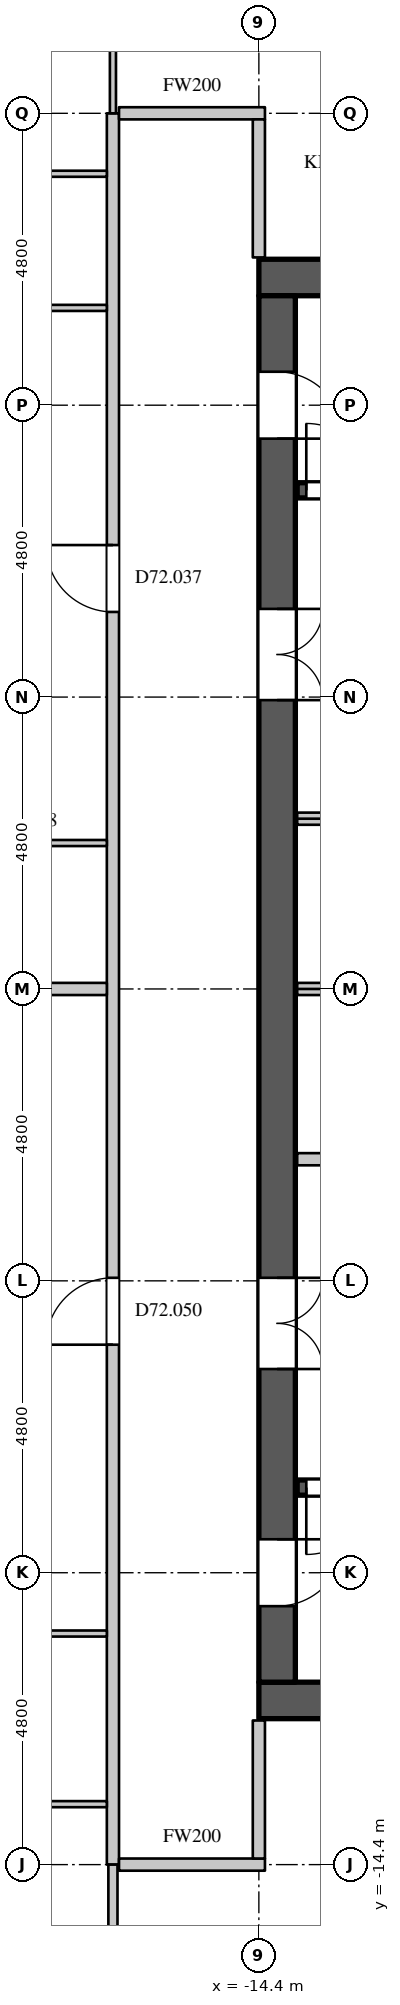
"""IFC4 building model, lengths in metres.
Left out: names, types, materials, properties, quantities, classifications, styles, units other than length and angle.
Written with IfcOpenShell. Run it as: python <this file> out.ifc"""

import sys

from ifc_helpers import new_model, si_unit, direction, frame, frame_2d, origin, place, context, subcontext, project, spatial, rectangle, extrude, element, fill, save


model = new_model("IFC4")
c1 = context("Model", 3, precision=1e-05, world=origin(), true_north=direction((0.0, 1.0)))
c2 = subcontext(c1, "Body", "Model", "MODEL_VIEW")
j1 = project(units=[si_unit("LENGTHUNIT", "METRE"), si_unit("PLANEANGLEUNIT", "RADIAN")], contexts=[c1])
p1 = place(None, origin())
s1 = spatial("IfcSite", under=j1, at=p1, CompositionType="ELEMENT")
p2 = place(p1, origin())
s2 = spatial("IfcBuilding", under=s1, at=p2, CompositionType="ELEMENT")
p3 = place(p2, frame((0.0, 0.0, 310.5)))
s3 = spatial("IfcBuildingStorey", under=s2, at=p3, CompositionType="ELEMENT", Elevation=310.5)
for number, where, z_axis, x_axis in (
    (1, (-14.4, 11.7, 0.0), (0.0, 0.0, 1.0), (1.0, 0.0, 0.0)),
    (2, (-14.4, -11.7, 0.0), (0.0, 0.0, 1.0), (1.0, 0.0, 0.0)),
):
    element("IfcWall", number, at=place(p3, frame(where, z_axis=z_axis, x_axis=x_axis)), inside=s3, PredefinedType="SHEAR", context=c2, shape_type="SweptSolid", body=[
        extrude(rectangle(XDim=28.8, YDim=0.6, at=frame_2d((14.4, 0.0))), origin(), (0.0, 0.0, 1.0), 4.2),
    ])
p4 = place(p3, frame((-14.1, -11.4, 0.0), z_axis=(0.0, 0.0, 1.0), x_axis=(0.0, 1.0, 0.0)))
e3 = element("IfcWall", 3, at=p4, inside=s3, PredefinedType="SHEAR", context=c2, shape_type="SweptSolid", body=[
    extrude(rectangle(XDim=22.8, YDim=0.6, at=frame_2d((11.4, 0.0))), origin(), (0.0, 0.0, 1.0), 4.2),
])
p5 = place(p4, frame((20.45, 0.0, 0.0)))
e4 = element("IfcOpeningElement", 4, at=p5, cuts=e3, PredefinedType="OPENING", context=c2, shape_type="SweptSolid", body=[
    extrude(rectangle(XDim=1.1, YDim=2.2, at=frame_2d((0.55, 1.1))), frame((0.0, 0.31, 0.0), z_axis=(0.0, -1.0, 0.0), x_axis=(1.0, 0.0, 0.0)), (0.0, 0.0, 1.0), 0.62),
])
p6 = place(p4, frame((1.25, 0.0, 0.0)))
e5 = element("IfcOpeningElement", 5, at=p6, cuts=e3, PredefinedType="OPENING", context=c2, shape_type="SweptSolid", body=[
    extrude(rectangle(XDim=1.1, YDim=2.2, at=frame_2d((0.55, 1.1))), frame((0.0, 0.31, 0.0), z_axis=(0.0, -1.0, 0.0), x_axis=(1.0, 0.0, 0.0)), (0.0, 0.0, 1.0), 0.62),
])
p7 = place(p4, frame((16.15, 0.0, 0.0)))
e6 = element("IfcOpeningElement", 6, at=p7, cuts=e3, PredefinedType="OPENING", context=c2, shape_type="SweptSolid", body=[
    extrude(rectangle(XDim=1.5, YDim=2.4, at=frame_2d((0.75, 1.2))), frame((0.0, 0.31, 0.0), z_axis=(0.0, -1.0, 0.0), x_axis=(1.0, 0.0, 0.0)), (0.0, 0.0, 1.0), 0.62),
])
p8 = place(p4, frame((5.15, 0.0, 0.0)))
e7 = element("IfcOpeningElement", 7, at=p8, cuts=e3, PredefinedType="OPENING", context=c2, shape_type="SweptSolid", body=[
    extrude(rectangle(XDim=1.5, YDim=2.4, at=frame_2d((0.75, 1.2))), frame((0.0, 0.31, 0.0), z_axis=(0.0, -1.0, 0.0), x_axis=(1.0, 0.0, 0.0)), (0.0, 0.0, 1.0), 0.62),
])
p9 = place(p3, frame((-16.8, -14.4, 0.0), z_axis=(0.0, 0.0, 1.0), x_axis=(0.0, 1.0, 0.0)))
e8 = element("IfcWall", 8, at=p9, inside=s3, PredefinedType="PARTITIONING", context=c2, shape_type="SweptSolid", body=[
    extrude(rectangle(XDim=28.8, YDim=0.2, at=frame_2d((14.4, 0.0))), origin(), (0.0, 0.0, 1.0), 3.9),
])
p10 = place(p9, frame((20.6, 0.0, 0.0)))
e9 = element("IfcOpeningElement", 9, at=p10, cuts=e8, PredefinedType="OPENING", context=c2, shape_type="SweptSolid", body=[
    extrude(rectangle(XDim=1.1, YDim=2.4, at=frame_2d((0.55, 1.2))), frame((0.0, 0.11, 0.0), z_axis=(0.0, -1.0, 0.0), x_axis=(1.0, 0.0, 0.0)), (0.0, 0.0, 1.0), 0.22),
])
p11 = place(p9, frame((8.55, 0.0, 0.0)))
e10 = element("IfcOpeningElement", 10, at=p11, cuts=e8, PredefinedType="OPENING", context=c2, shape_type="SweptSolid", body=[
    extrude(rectangle(XDim=1.1, YDim=2.4, at=frame_2d((0.55, 1.2))), frame((0.0, 0.11, 0.0), z_axis=(0.0, -1.0, 0.0), x_axis=(1.0, 0.0, 0.0)), (0.0, 0.0, 1.0), 0.22),
])
for number, where, z_axis, x_axis in (
    (11, (-16.7, -14.4, 0.0), (0.0, 0.0, 1.0), (1.0, 0.0, 0.0)),
    (12, (-16.7, 14.4, 0.0), (0.0, 0.0, 1.0), (1.0, 0.0, 0.0)),
):
    element("IfcWall", number, at=place(p3, frame(where, z_axis=z_axis, x_axis=x_axis)), inside=s3, PredefinedType="PARTITIONING", context=c2, shape_type="SweptSolid", body=[
        extrude(rectangle(XDim=2.4, YDim=0.2, at=frame_2d((1.2, 0.0))), origin(), (0.0, 0.0, 1.0), 3.9),
    ])
for number, where, z_axis, x_axis in (
    (13, (-14.4, -14.3, 0.0), (0.0, 0.0, 1.0), (0.0, 1.0, 0.0)),
    (14, (-14.4, 12.03, 0.0), (0.0, 0.0, 1.0), (0.0, 1.0, 0.0)),
):
    element("IfcWall", number, at=place(p3, frame(where, z_axis=z_axis, x_axis=x_axis)), inside=s3, PredefinedType="PARTITIONING", context=c2, shape_type="SweptSolid", body=[
        extrude(rectangle(XDim=2.27, YDim=0.2, at=frame_2d((1.135, 0.0))), origin(), (0.0, 0.0, 1.0), 3.9),
    ])
p12 = place(p3, frame((-16.8, -19.828, 0.0), z_axis=(0.0, 0.0, 1.0), x_axis=(0.0, 1.0, 0.0)))
e15 = element("IfcWall", 15, at=p12, inside=s3, PredefinedType="PARTITIONING", context=c2, shape_type="SweptSolid", body=[
    extrude(rectangle(XDim=5.428, YDim=0.15, at=frame_2d((2.714, 0.0))), origin(), (0.0, 0.0, 1.0), 3.9),
])
p13 = place(p12, frame((2.45, 0.0, 0.0)))
e16 = element("IfcOpeningElement", 16, at=p13, cuts=e15, PredefinedType="OPENING", context=c2, shape_type="SweptSolid", body=[
    extrude(rectangle(XDim=0.9, YDim=2.2, at=frame_2d((0.45, 1.1))), frame((0.0, 0.085, 0.0), z_axis=(0.0, -1.0, 0.0), x_axis=(1.0, 0.0, 0.0)), (0.0, 0.0, 1.0), 0.17),
])
p14 = place(p3, frame((-26.455, 0.0, 0.0), z_axis=(0.0, 0.0, 1.0), x_axis=(1.0, 0.0, 0.0)))
e17 = element("IfcWall", 17, at=p14, inside=s3, PredefinedType="PARTITIONING", context=c2, shape_type="SweptSolid", body=[
    extrude(rectangle(XDim=9.555, YDim=0.2, at=frame_2d((4.778, 0.0))), origin(), (0.0, 0.0, 1.0), 3.9),
])
p15 = place(p3, frame((-13.77, -2.8, 0.0), z_axis=(0.0, 0.0, 1.0), x_axis=(1.0, 0.0, 0.0)))
e18 = element("IfcWall", 18, at=p15, inside=s3, PredefinedType="PARTITIONING", context=c2, shape_type="SweptSolid", body=[
    extrude(rectangle(XDim=3.37, YDim=0.2, at=frame_2d((1.685, 0.0))), origin(), (0.0, 0.0, 1.0), 3.9),
])
p16 = place(p15, frame((1.35, 0.0, 0.0)))
e19 = element("IfcOpeningElement", 19, at=p16, cuts=e18, PredefinedType="OPENING", context=c2, shape_type="SweptSolid", body=[
    extrude(rectangle(XDim=0.6, YDim=2.0, at=frame_2d((0.3, 1.0))), frame((0.0, 0.11, 0.0), z_axis=(0.0, -1.0, 0.0), x_axis=(1.0, 0.0, 0.0)), (0.0, 0.0, 1.0), 0.22),
])
p17 = place(p3, frame((-13.77, 0.0, 0.0), z_axis=(0.0, 0.0, 1.0), x_axis=(1.0, 0.0, 0.0)))
e20 = element("IfcWall", 20, at=p17, inside=s3, PredefinedType="PARTITIONING", context=c2, shape_type="SweptSolid", body=[
    extrude(rectangle(XDim=21.57, YDim=0.2, at=frame_2d((10.785, 0.0))), origin(), (0.0, 0.0, 1.0), 3.9),
])
p18 = place(p3, frame((-13.77, 2.8, 0.0), z_axis=(0.0, 0.0, 1.0), x_axis=(1.0, 0.0, 0.0)))
e21 = element("IfcWall", 21, at=p18, inside=s3, PredefinedType="PARTITIONING", context=c2, shape_type="SweptSolid", body=[
    extrude(rectangle(XDim=5.95, YDim=0.2, at=frame_2d((2.975, 0.0))), origin(), (0.0, 0.0, 1.0), 3.9),
])
p19 = place(p18, frame((1.1, 0.0, 0.0)))
e22 = element("IfcOpeningElement", 22, at=p19, cuts=e21, PredefinedType="OPENING", context=c2, shape_type="SweptSolid", body=[
    extrude(rectangle(XDim=1.1, YDim=2.2, at=frame_2d((0.55, 1.1))), frame((0.0, 0.11, 0.0), z_axis=(0.0, -1.0, 0.0), x_axis=(1.0, 0.0, 0.0)), (0.0, 0.0, 1.0), 0.22),
])
p20 = place(p18, frame((4.1, 0.0, 0.0)))
e23 = element("IfcOpeningElement", 23, at=p20, cuts=e21, PredefinedType="OPENING", context=c2, shape_type="SweptSolid", body=[
    extrude(rectangle(XDim=1.1, YDim=2.2, at=frame_2d((0.55, 1.1))), frame((0.0, 0.11, 0.0), z_axis=(0.0, -1.0, 0.0), x_axis=(1.0, 0.0, 0.0)), (0.0, 0.0, 1.0), 0.22),
])
p21 = place(p3, frame((-13.77, -8.2, 0.0), z_axis=(0.0, 0.0, 1.0), x_axis=(1.0, 0.0, 0.0)))
e24 = element("IfcWall", 24, at=p21, inside=s3, PredefinedType="SHEAR", context=c2, shape_type="SweptSolid", body=[
    extrude(rectangle(XDim=8.495, YDim=0.25, at=frame_2d((4.248, 0.0))), origin(), (0.0, 0.0, 1.0), 3.9),
])
p22 = place(p21, frame((0.15, 0.0, 0.0)))
e25 = element("IfcOpeningElement", 25, at=p22, cuts=e24, PredefinedType="OPENING", context=c2, shape_type="SweptSolid", body=[
    extrude(rectangle(XDim=1.1, YDim=2.2, at=frame_2d((0.55, 1.1))), frame((0.0, 0.135, 0.0), z_axis=(0.0, -1.0, 0.0), x_axis=(1.0, 0.0, 0.0)), (0.0, 0.0, 1.0), 0.27),
])
p23 = place(p3, frame((-13.77, 8.2, 0.0), z_axis=(0.0, 0.0, 1.0), x_axis=(1.0, 0.0, 0.0)))
e26 = element("IfcWall", 26, at=p23, inside=s3, PredefinedType="SHEAR", context=c2, shape_type="SweptSolid", body=[
    extrude(rectangle(XDim=8.495, YDim=0.25, at=frame_2d((4.248, 0.0))), origin(), (0.0, 0.0, 1.0), 3.9),
])
p24 = place(p23, frame((0.15, 0.0, 0.0)))
e27 = element("IfcOpeningElement", 27, at=p24, cuts=e26, PredefinedType="OPENING", context=c2, shape_type="SweptSolid", body=[
    extrude(rectangle(XDim=1.1, YDim=2.2, at=frame_2d((0.55, 1.1))), frame((0.0, 0.135, 0.0), z_axis=(0.0, -1.0, 0.0), x_axis=(1.0, 0.0, 0.0)), (0.0, 0.0, 1.0), 0.27),
])
p25 = place(p3, frame((-20.55, -13.406, 0.0), z_axis=(0.0, 0.0, 1.0), x_axis=(1.0, 0.0, 0.0)))
e28 = element("IfcWall", 28, at=p25, inside=s3, PredefinedType="PARTITIONING", context=c2, shape_type="SweptSolid", body=[
    extrude(rectangle(XDim=3.65, YDim=0.1, at=frame_2d((1.825, 0.0))), origin(), (0.0, 0.0, 1.0), 3.9),
])
p26 = place(p3, frame((-20.475, -10.6, 0.0), z_axis=(0.0, 0.0, 1.0), x_axis=(1.0, 0.0, 0.0)))
e29 = element("IfcWall", 29, at=p26, inside=s3, PredefinedType="PARTITIONING", context=c2, shape_type="SweptSolid", body=[
    extrude(rectangle(XDim=3.575, YDim=0.1, at=frame_2d((1.788, 0.0))), origin(), (0.0, 0.0, 1.0), 3.9),
])
p27 = place(p26, frame((1.3, 0.0, 0.0)))
e30 = element("IfcOpeningElement", 30, at=p27, cuts=e29, PredefinedType="OPENING", context=c2, shape_type="SweptSolid", body=[
    extrude(rectangle(XDim=0.9, YDim=2.2, at=frame_2d((0.45, 1.1))), frame((0.0, 0.06, 0.0), z_axis=(0.0, -1.0, 0.0), x_axis=(1.0, 0.0, 0.0)), (0.0, 0.0, 1.0), 0.12),
])
p28 = place(p3, frame((-20.275, 2.4, 0.0), z_axis=(0.0, 0.0, 1.0), x_axis=(1.0, 0.0, 0.0)))
e31 = element("IfcWall", 31, at=p28, inside=s3, PredefinedType="PARTITIONING", context=c2, shape_type="SweptSolid", body=[
    extrude(rectangle(XDim=3.375, YDim=0.1, at=frame_2d((1.688, 0.0))), origin(), (0.0, 0.0, 1.0), 3.9),
])
p29 = place(p28, frame((1.2, 0.0, 0.0)))
e32 = element("IfcOpeningElement", 32, at=p29, cuts=e31, PredefinedType="OPENING", context=c2, shape_type="SweptSolid", body=[
    extrude(rectangle(XDim=0.9, YDim=2.2, at=frame_2d((0.45, 1.1))), frame((0.0, 0.06, 0.0), z_axis=(0.0, -1.0, 0.0), x_axis=(1.0, 0.0, 0.0)), (0.0, 0.0, 1.0), 0.12),
])
p30 = place(p3, frame((-18.975, 11.2, 0.0), z_axis=(0.0, 0.0, 1.0), x_axis=(1.0, 0.0, 0.0)))
e33 = element("IfcWall", 33, at=p30, inside=s3, PredefinedType="PARTITIONING", context=c2, shape_type="SweptSolid", body=[
    extrude(rectangle(XDim=2.075, YDim=0.1, at=frame_2d((1.038, 0.0))), origin(), (0.0, 0.0, 1.0), 3.3),
])
p31 = place(p30, frame((0.15, 0.0, 0.0)))
e34 = element("IfcOpeningElement", 34, at=p31, cuts=e33, PredefinedType="OPENING", context=c2, shape_type="SweptSolid", body=[
    extrude(rectangle(XDim=0.9, YDim=2.2, at=frame_2d((0.45, 1.1))), frame((0.0, 0.06, 0.0), z_axis=(0.0, -1.0, 0.0), x_axis=(1.0, 0.0, 0.0)), (0.0, 0.0, 1.0), 0.12),
])
p32 = place(p3, frame((-19.9, 13.406, 0.0), z_axis=(0.0, 0.0, 1.0), x_axis=(1.0, 0.0, 0.0)))
e35 = element("IfcWall", 35, at=p32, inside=s3, PredefinedType="PARTITIONING", context=c2, shape_type="SweptSolid", body=[
    extrude(rectangle(XDim=3.0, YDim=0.1, at=frame_2d((1.5, 0.0))), origin(), (0.0, 0.0, 1.0), 3.9),
])
p33 = place(p3, frame((-16.8, 14.4, 0.0), z_axis=(0.0, 0.0, 1.0), x_axis=(0.0, 1.0, 0.0)))
e36 = element("IfcWall", 36, at=p33, inside=s3, PredefinedType="PARTITIONING", context=c2, shape_type="SweptSolid", body=[
    extrude(rectangle(XDim=3.9, YDim=0.1, at=frame_2d((1.95, 0.0))), origin(), (0.0, 0.0, 1.0), 3.9),
])
p34 = place(p24, origin())
e37 = element("IfcDoor", 37, at=p34, inside=s3, OperationType="SINGLE_SWING_LEFT", PredefinedType="DOOR", context=c2, shape_type="SweptSolid", body=[
    extrude(rectangle(XDim=1.1, YDim=2.2, at=frame_2d((0.55, 1.1))), frame((0.0, 0.025, 0.0), z_axis=(0.0, -1.0, 0.0), x_axis=(1.0, 0.0, 0.0)), (0.0, 0.0, 1.0), 0.05),
])
fill(e27, e37)
p35 = place(p22, origin())
e38 = element("IfcDoor", 38, at=p35, inside=s3, OperationType="SINGLE_SWING_RIGHT", PredefinedType="DOOR", context=c2, shape_type="SweptSolid", body=[
    extrude(rectangle(XDim=1.1, YDim=2.2, at=frame_2d((0.55, 1.1))), frame((0.0, 0.025, 0.0), z_axis=(0.0, -1.0, 0.0), x_axis=(1.0, 0.0, 0.0)), (0.0, 0.0, 1.0), 0.05),
])
fill(e25, e38)
p36 = place(p5, origin())
e39 = element("IfcDoor", 39, at=p36, inside=s3, OperationType="SINGLE_SWING_RIGHT", PredefinedType="DOOR", context=c2, shape_type="SweptSolid", body=[
    extrude(rectangle(XDim=1.1, YDim=2.2, at=frame_2d((0.55, 1.1))), frame((0.0, -0.245, 0.0), z_axis=(0.0, -1.0, 0.0), x_axis=(1.0, 0.0, 0.0)), (0.0, 0.0, 1.0), 0.05),
])
fill(e4, e39)
p37 = place(p6, origin())
e40 = element("IfcDoor", 40, at=p37, inside=s3, OperationType="SINGLE_SWING_LEFT", PredefinedType="DOOR", context=c2, shape_type="SweptSolid", body=[
    extrude(rectangle(XDim=1.1, YDim=2.2, at=frame_2d((0.55, 1.1))), frame((0.0, -0.245, 0.0), z_axis=(0.0, -1.0, 0.0), x_axis=(1.0, 0.0, 0.0)), (0.0, 0.0, 1.0), 0.05),
])
fill(e5, e40)
p38 = place(p7, origin())
e41 = element("IfcDoor", 41, at=p38, inside=s3, OperationType="DOUBLE_DOOR_SINGLE_SWING", PredefinedType="DOOR", context=c2, shape_type="SweptSolid", body=[
    extrude(rectangle(XDim=1.5, YDim=2.4, at=frame_2d((0.75, 1.2))), frame((0.0, -0.245, 0.0), z_axis=(0.0, -1.0, 0.0), x_axis=(1.0, 0.0, 0.0)), (0.0, 0.0, 1.0), 0.05),
])
fill(e6, e41)
p39 = place(p8, origin())
e42 = element("IfcDoor", 42, at=p39, inside=s3, OperationType="DOUBLE_DOOR_SINGLE_SWING", PredefinedType="DOOR", context=c2, shape_type="SweptSolid", body=[
    extrude(rectangle(XDim=1.5, YDim=2.4, at=frame_2d((0.75, 1.2))), frame((0.0, -0.245, 0.0), z_axis=(0.0, -1.0, 0.0), x_axis=(1.0, 0.0, 0.0)), (0.0, 0.0, 1.0), 0.05),
])
fill(e7, e42)
p40 = place(p10, origin())
e43 = element("IfcDoor", 43, at=p40, inside=s3, OperationType="SINGLE_SWING_RIGHT", PredefinedType="DOOR", context=c2, shape_type="SweptSolid", body=[
    extrude(rectangle(XDim=1.1, YDim=2.4, at=frame_2d((0.55, 1.2))), frame((0.0, 0.025, 0.0), z_axis=(0.0, -1.0, 0.0), x_axis=(1.0, 0.0, 0.0)), (0.0, 0.0, 1.0), 0.05),
])
fill(e9, e43)
p41 = place(p11, origin())
e44 = element("IfcDoor", 44, at=p41, inside=s3, OperationType="SINGLE_SWING_LEFT", PredefinedType="DOOR", context=c2, shape_type="SweptSolid", body=[
    extrude(rectangle(XDim=1.1, YDim=2.4, at=frame_2d((0.55, 1.2))), frame((0.0, 0.025, 0.0), z_axis=(0.0, -1.0, 0.0), x_axis=(1.0, 0.0, 0.0)), (0.0, 0.0, 1.0), 0.05),
])
fill(e10, e44)
save(model, sys.argv[1])
